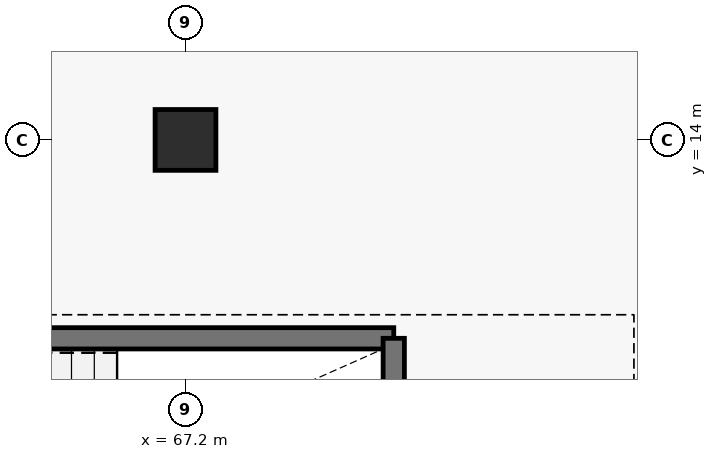
"""IFC4 building model, lengths in metres.
Left out: names, types, materials, properties, quantities, classifications, styles, units other than length and angle.
Written with IfcOpenShell. Run it as: python <this file> out.ifc"""

import sys

from ifc_helpers import new_model, si_unit, direction, frame, frame_2d, origin, origin_2d, place, context, subcontext, project, spatial, rectangle, extrude, element, save


model = new_model("IFC4")
c1 = context("Model", 3, precision=1e-05, world=origin(), true_north=direction((0.0, 1.0)))
c2 = subcontext(c1, "Body", "Model", "MODEL_VIEW")
j1 = project(units=[si_unit("LENGTHUNIT", "METRE"), si_unit("PLANEANGLEUNIT", "RADIAN")], contexts=[c1])
p1 = place(None, origin())
s1 = spatial("IfcSite", under=j1, at=p1, CompositionType="ELEMENT")
p2 = place(p1, origin())
s2 = spatial("IfcBuilding", under=s1, at=p2, CompositionType="ELEMENT")
p3 = place(p2, frame((0.0, 0.0, 5.44)))
s3 = spatial("IfcBuildingStorey", under=s2, at=p3, CompositionType="ELEMENT", Elevation=5.44)
p4 = place(p3, frame((67.2, 14.0, 0.0), z_axis=(0.0, 0.0, 1.0), x_axis=(1.0, 0.0, 0.0)))
e1 = element("IfcColumn", 1, at=p4, inside=s3, PredefinedType="COLUMN", context=c2, shape_type="SweptSolid", body=[
    extrude(rectangle(XDim=0.8, YDim=0.8, at=origin_2d()), origin(), (0.0, 0.0, 1.0), 4.16),
])
p5 = place(p3, frame((61.06, 11.39, 0.0), z_axis=(0.0, 0.0, 1.0), x_axis=(1.0, 0.0, 0.0)))
e2 = element("IfcWall", 2, at=p5, inside=s3, PredefinedType="SHEAR", context=c2, shape_type="SweptSolid", body=[
    extrude(rectangle(XDim=8.88, YDim=0.28, at=frame_2d((4.44, 0.0))), origin(), (0.0, 0.0, 1.0), 4.16),
])
p6 = place(p3, frame((69.94, 7.96, 0.0), z_axis=(0.0, 0.0, 1.0), x_axis=(0.0, 1.0, 0.0)))
e3 = element("IfcWall", 3, at=p6, inside=s3, PredefinedType="SHEAR", context=c2, shape_type="SweptSolid", body=[
    extrude(rectangle(XDim=3.43, YDim=0.28, at=frame_2d((1.715, 0.0))), origin(), (0.0, 0.0, 1.0), 4.16),
])
save(model, sys.argv[1])
